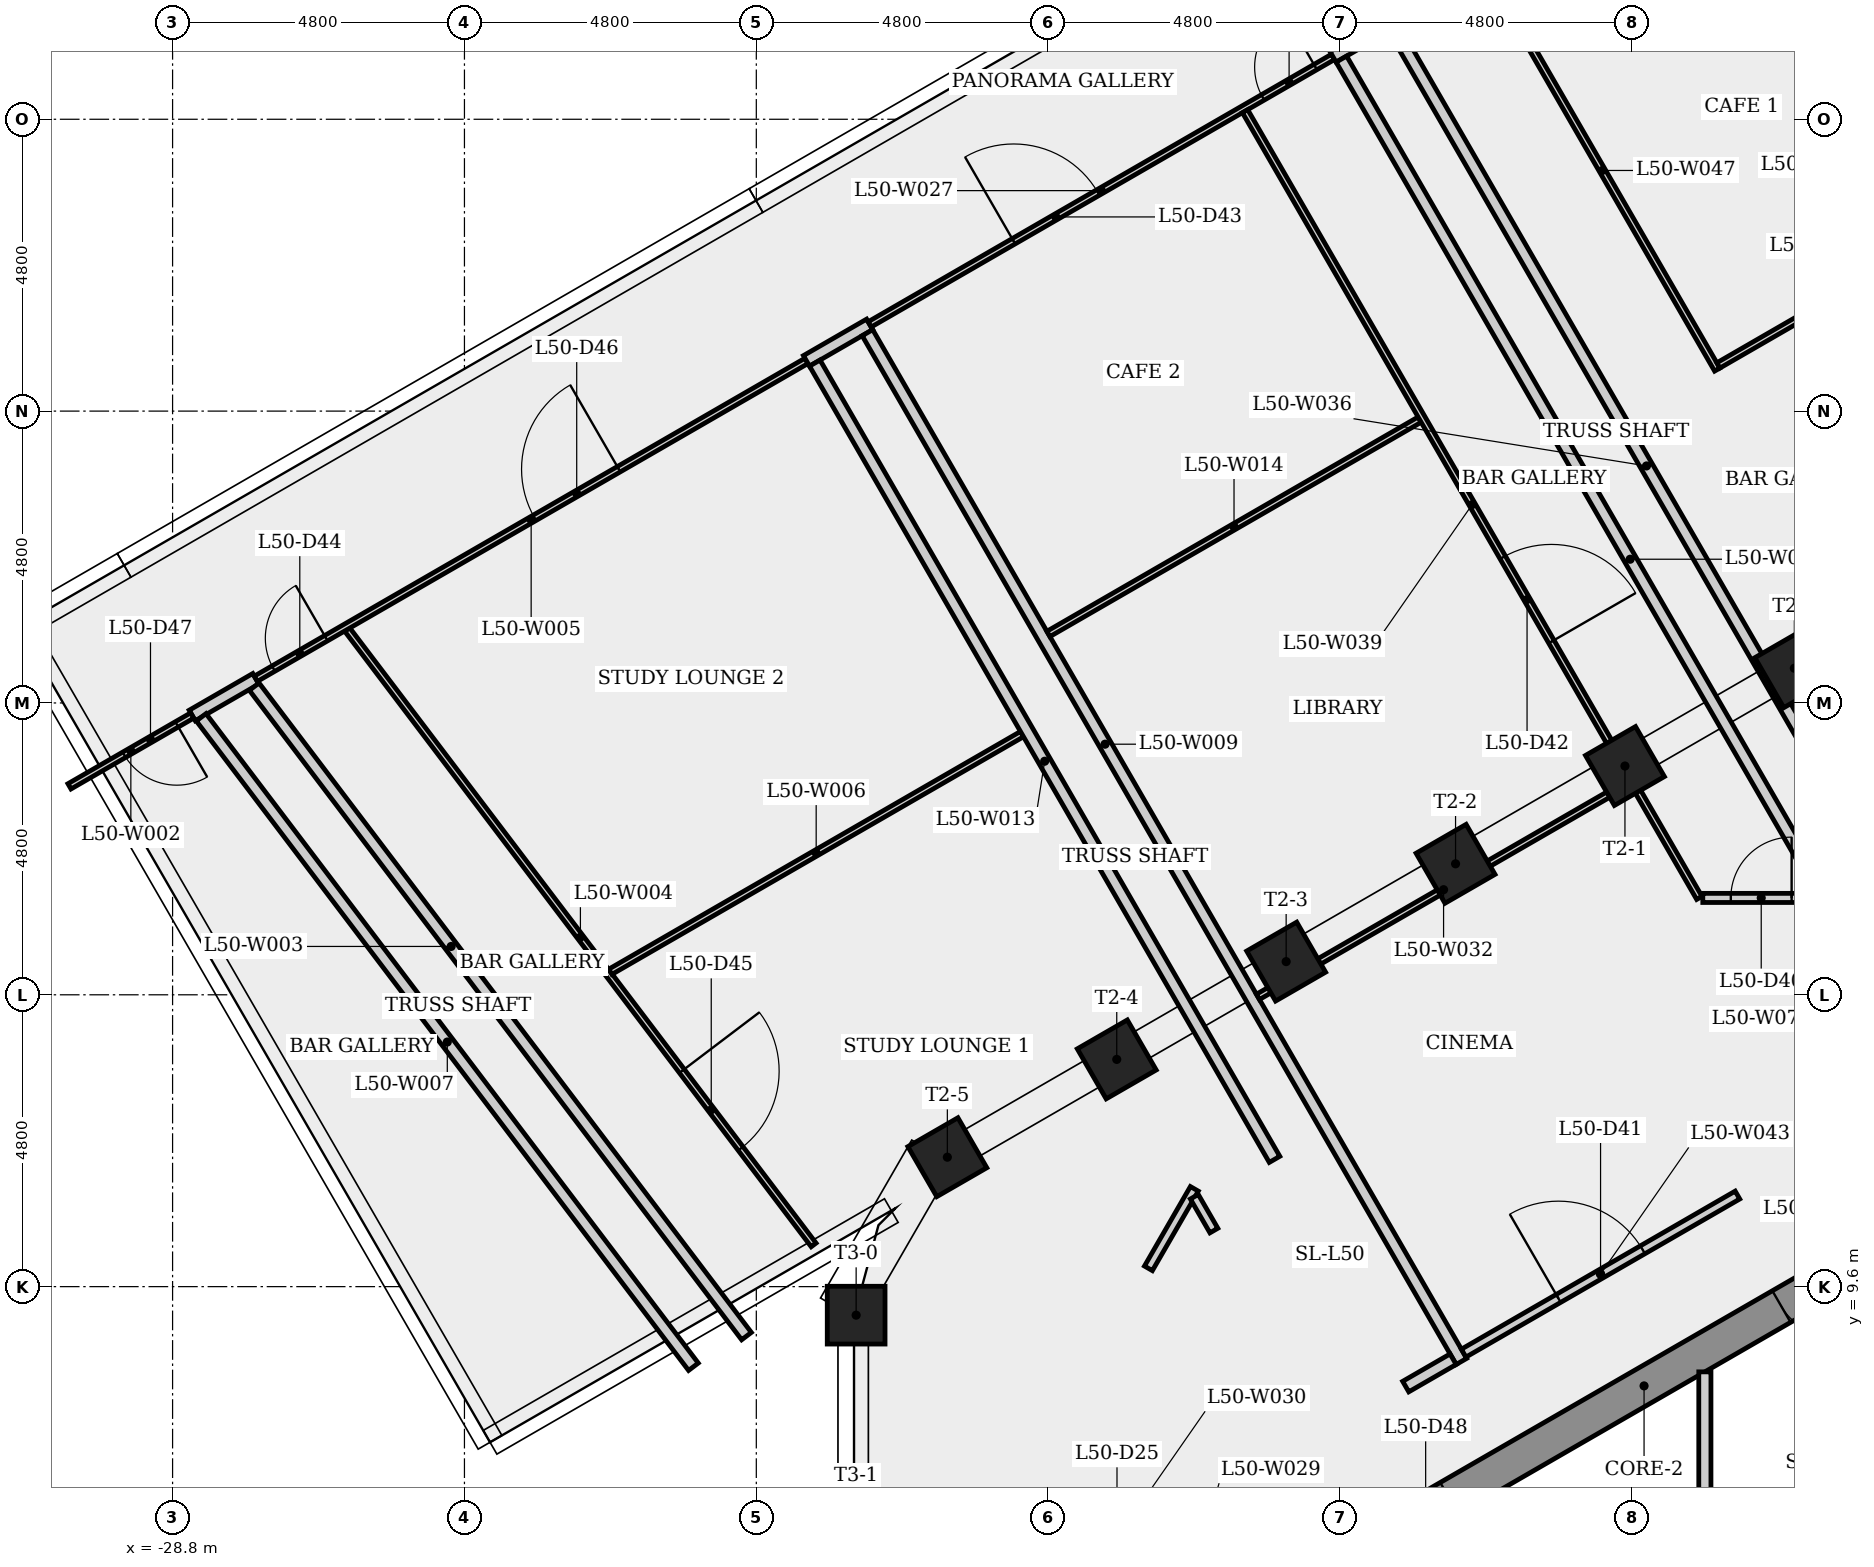
"""IFC4 building model, lengths in metres.
Left out: names, types, materials, properties, quantities, classifications, styles, units other than length and angle.
Written with IfcOpenShell. Run it as: python <this file> out.ifc"""

import sys

from ifc_helpers import new_model, si_unit, direction, frame, frame_2d, origin, origin_2d, place, context, subcontext, project, spatial, rectangle, extrude, element, fill, save


model = new_model("IFC4")
c1 = context("Model", 3, precision=1e-05, world=origin(), true_north=direction((0.0, 1.0)))
c2 = subcontext(c1, "Body", "Model", "MODEL_VIEW")
j1 = project(units=[si_unit("LENGTHUNIT", "METRE"), si_unit("PLANEANGLEUNIT", "RADIAN")], contexts=[c1])
p1 = place(None, origin())
s1 = spatial("IfcSite", under=j1, at=p1, CompositionType="ELEMENT")
p2 = place(p1, origin())
s2 = spatial("IfcBuilding", under=s1, at=p2, CompositionType="ELEMENT")
p3 = place(p2, frame((0.0, 0.0, 186.7)))
s3 = spatial("IfcBuildingStorey", under=s2, at=p3, CompositionType="ELEMENT", Elevation=186.7)
p4 = place(p3, frame((0.15, 10.71, 0.0), z_axis=(0.0, 0.0, 1.0), x_axis=(-0.866023993627, -0.500002442456, 0.0)))
e1 = element("IfcWall", 1, at=p4, inside=s3, PredefinedType="SHEAR", context=c2, shape_type="SweptSolid", body=[
    extrude(rectangle(XDim=10.97, YDim=0.6, at=frame_2d((5.485, 0.0))), origin(), (0.0, 0.0, 1.0), 4.0),
])
p5 = place(p4, frame((9.182, 0.0, 0.0)))
e2 = element("IfcOpeningElement", 2, at=p5, cuts=e1, PredefinedType="OPENING", context=c2, shape_type="SweptSolid", body=[
    extrude(rectangle(XDim=0.9, YDim=2.1, at=frame_2d((0.45, 1.05))), frame((0.0, 0.31, 0.0), z_axis=(0.0, -1.0, 0.0), x_axis=(1.0, 0.0, 0.0)), (0.0, 0.0, 1.0), 0.62),
])
p6 = place(p4, frame((1.975, 0.0, 0.0)))
e3 = element("IfcOpeningElement", 3, at=p6, cuts=e1, PredefinedType="OPENING", context=c2, shape_type="SweptSolid", body=[
    extrude(rectangle(XDim=0.9, YDim=2.1, at=frame_2d((0.45, 1.05))), frame((0.0, 0.31, 0.0), z_axis=(0.0, -1.0, 0.0), x_axis=(1.0, 0.0, 0.0)), (0.0, 0.0, 1.0), 0.62),
])
for number, where, z_axis, x_axis in (
    (4, (-2.128, 19.771, 0.0), (0.0, 0.0, 1.0), (-0.5, 0.866, 0.0)),
    (5, (-4.914, 18.163, 0.0), (0.0, 0.0, 1.0), (-0.5, 0.866, 0.0)),
    (6, (-7.7, 16.554, 0.0), (0.0, 0.0, 1.0), (-0.5, 0.866, 0.0)),
    (7, (-10.486, 14.946, 0.0), (0.0, 0.0, 1.0), (-0.5, 0.866, 0.0)),
    (8, (-13.272, 13.337, 0.0), (0.0, 0.0, 1.0), (-0.5, 0.866, 0.0)),
    (9, (-16.058, 11.729, 0.0), (0.0, 0.0, 1.0), (-0.5, 0.866, 0.0)),
    (10, (-17.558, 9.131, 0.0), (0.0, 0.0, 1.0), (-1.0, 0.0, 0.0)),
):
    element("IfcColumn", number, at=place(p3, frame(where, z_axis=z_axis, x_axis=x_axis)), inside=s3, PredefinedType="COLUMN", context=c2, shape_type="SweptSolid", body=[
        extrude(rectangle(XDim=0.95, YDim=0.95, at=origin_2d()), origin(), (0.0, 0.0, 1.0), 4.0),
    ])
p7 = place(p3, frame((-28.477, 18.994, 0.0), z_axis=(0.0, 0.0, 1.0), x_axis=(0.866108180176, 0.499856599668, 0.0)))
e11 = element("IfcWall", 11, at=p7, inside=s3, PredefinedType="PLUMBINGWALL", context=c2, shape_type="SweptSolid", body=[
    extrude(rectangle(XDim=1.208, YDim=0.2, at=frame_2d((0.604, 0.0))), origin(), (0.0, 0.0, 1.0), 3.6),
])
p8 = place(p3, frame((-28.477, 18.994, 0.0), z_axis=(0.0, 0.0, 1.0), x_axis=(-0.86603036398, -0.499991408591, 0.0)))
e12 = element("IfcWall", 12, at=p8, inside=s3, PredefinedType="PARTITIONING", context=c2, shape_type="SweptSolid", body=[
    extrude(rectangle(XDim=2.331, YDim=0.1, at=frame_2d((1.166, 0.0))), origin(), (0.0, 0.0, 1.0), 3.6),
])
p9 = place(p8, frame((0.292, 0.0, 0.0)))
e13 = element("IfcOpeningElement", 13, at=p9, cuts=e12, PredefinedType="OPENING", context=c2, shape_type="SweptSolid", body=[
    extrude(rectangle(XDim=1.0, YDim=2.1, at=frame_2d((0.5, 1.05))), frame((0.0, 0.06, 0.0), z_axis=(0.0, -1.0, 0.0), x_axis=(1.0, 0.0, 0.0)), (0.0, 0.0, 1.0), 0.12),
])
p10 = place(p3, frame((-27.457, 19.468, 0.0), z_axis=(0.0, 0.0, 1.0), x_axis=(0.60402881465, -0.796962477832, 0.0)))
e14 = element("IfcWall", 14, at=p10, inside=s3, PredefinedType="PLUMBINGWALL", context=c2, shape_type="SweptSolid", body=[
    extrude(rectangle(XDim=13.403, YDim=0.2, at=frame_2d((6.702, 0.0))), origin(), (0.0, 0.0, 1.0), 3.6),
])
p11 = place(p3, frame((-25.929, 20.408, 0.0), z_axis=(0.0, 0.0, 1.0), x_axis=(0.604027547498, -0.796963438223, 0.0)))
e15 = element("IfcWall", 15, at=p11, inside=s3, PredefinedType="PARTITIONING", context=c2, shape_type="SweptSolid", body=[
    extrude(rectangle(XDim=12.701, YDim=0.1, at=frame_2d((6.35, 0.0))), origin(), (0.0, 0.0, 1.0), 3.6),
])
p12 = place(p11, frame((9.113, 0.0, 0.0)))
e16 = element("IfcOpeningElement", 16, at=p12, cuts=e15, PredefinedType="OPENING", context=c2, shape_type="SweptSolid", body=[
    extrude(rectangle(XDim=1.6, YDim=2.1, at=frame_2d((0.8, 1.05))), frame((0.0, 0.06, 0.0), z_axis=(0.0, -1.0, 0.0), x_axis=(1.0, 0.0, 0.0)), (0.0, 0.0, 1.0), 0.12),
])
p13 = place(p3, frame((-27.431, 19.598, 0.0), z_axis=(0.0, 0.0, 1.0), x_axis=(0.866023465201, 0.500003357709, 0.0)))
e17 = element("IfcWall", 17, at=p13, inside=s3, PredefinedType="PARTITIONING", context=c2, shape_type="SweptSolid", body=[
    extrude(rectangle(XDim=10.458, YDim=0.1, at=frame_2d((5.229, 0.0))), origin(), (0.0, 0.0, 1.0), 3.6),
])
p14 = place(p13, frame((0.335, 0.0, 0.0)))
e18 = element("IfcOpeningElement", 18, at=p14, cuts=e17, PredefinedType="OPENING", context=c2, shape_type="SweptSolid", body=[
    extrude(rectangle(XDim=1.0, YDim=2.1, at=frame_2d((0.5, 1.05))), frame((0.0, 0.06, 0.0), z_axis=(0.0, -1.0, 0.0), x_axis=(1.0, 0.0, 0.0)), (0.0, 0.0, 1.0), 0.12),
])
p15 = place(p13, frame((5.294, 0.0, 0.0)))
e19 = element("IfcOpeningElement", 19, at=p15, cuts=e17, PredefinedType="OPENING", context=c2, shape_type="SweptSolid", body=[
    extrude(rectangle(XDim=1.6, YDim=2.1, at=frame_2d((0.8, 1.05))), frame((0.0, 0.06, 0.0), z_axis=(0.0, -1.0, 0.0), x_axis=(1.0, 0.0, 0.0)), (0.0, 0.0, 1.0), 0.12),
])
p16 = place(p3, frame((-21.6, 14.779, 0.0), z_axis=(0.0, 0.0, 1.0), x_axis=(0.866022269728, 0.500005428306, 0.0)))
e20 = element("IfcWall", 20, at=p16, inside=s3, PredefinedType="PARTITIONING", context=c2, shape_type="SweptSolid", body=[
    extrude(rectangle(XDim=7.817, YDim=0.1, at=frame_2d((3.908, 0.0))), origin(), (0.0, 0.0, 1.0), 3.6),
])
p17 = place(p3, frame((-20.234, 8.282, 0.0), z_axis=(0.0, 0.0, 1.0), x_axis=(-0.60402881465, 0.796962477832, 0.0)))
e21 = element("IfcWall", 21, at=p17, inside=s3, PredefinedType="PLUMBINGWALL", context=c2, shape_type="SweptSolid", body=[
    extrude(rectangle(XDim=13.403, YDim=0.2, at=frame_2d((6.702, 0.0))), origin(), (0.0, 0.0, 1.0), 3.6),
])
p18 = place(p3, frame((-18.375, 24.826, 0.0), z_axis=(0.0, 0.0, 1.0), x_axis=(0.866094119867, 0.499880961361, 0.0)))
e22 = element("IfcWall", 22, at=p18, inside=s3, PredefinedType="PLUMBINGWALL", context=c2, shape_type="SweptSolid", body=[
    extrude(rectangle(XDim=1.2, YDim=0.2, at=frame_2d((0.6, 0.0))), origin(), (0.0, 0.0, 1.0), 3.6),
])
p19 = place(p3, frame((-17.372, 25.29, 0.0), z_axis=(0.0, 0.0, 1.0), x_axis=(0.5000029704, -0.866023688816, 0.0)))
e23 = element("IfcWall", 23, at=p19, inside=s3, PredefinedType="PLUMBINGWALL", context=c2, shape_type="SweptSolid", body=[
    extrude(rectangle(XDim=19.538, YDim=0.2, at=frame_2d((9.769, 0.0))), origin(), (0.0, 0.0, 1.0), 3.6),
])
p20 = place(p3, frame((-18.238, 24.79, 0.0), z_axis=(0.0, 0.0, 1.0), x_axis=(0.500002415695, -0.866024009078, 0.0)))
e24 = element("IfcWall", 24, at=p20, inside=s3, PredefinedType="PLUMBINGWALL", context=c2, shape_type="SweptSolid", body=[
    extrude(rectangle(XDim=15.123, YDim=0.2, at=frame_2d((7.561, 0.0))), origin(), (0.0, 0.0, 1.0), 3.6),
])
p21 = place(p3, frame((-14.396, 20.335, 0.0), z_axis=(0.0, 0.0, 1.0), x_axis=(0.866031034943, 0.499990246421, 0.0)))
e25 = element("IfcWall", 25, at=p21, inside=s3, PredefinedType="PARTITIONING", context=c2, shape_type="SweptSolid", body=[
    extrude(rectangle(XDim=7.05, YDim=0.1, at=frame_2d((3.525, 0.0))), origin(), (0.0, 0.0, 1.0), 3.6),
])
p22 = place(p3, frame((-12.751, 9.901, 0.0), z_axis=(0.0, 0.0, 1.0), x_axis=(0.500016320516, 0.866015980925, 0.0)))
e26 = element("IfcWall", 26, at=p22, inside=s3, PredefinedType="PARTITIONING", context=c2, shape_type="SweptSolid", body=[
    extrude(rectangle(XDim=1.51, YDim=0.15, at=frame_2d((0.755, 0.0))), origin(), (0.0, 0.0, 1.0), 3.6),
])
p23 = place(p3, frame((-11.996, 11.079, 0.0), z_axis=(0.0, 0.0, 1.0), x_axis=(0.50006233641, -0.86598941085, 0.0)))
e27 = element("IfcWall", 27, at=p23, inside=s3, PredefinedType="PARTITIONING", context=c2, shape_type="SweptSolid", body=[
    extrude(rectangle(XDim=0.643, YDim=0.15, at=frame_2d((0.321, 0.0))), origin(), (0.0, 0.0, 1.0), 3.6),
])
p24 = place(p3, frame((-17.336, 25.426, 0.0), z_axis=(0.0, 0.0, 1.0), x_axis=(0.866020190133, 0.500009030201, 0.0)))
e28 = element("IfcWall", 28, at=p24, inside=s3, PredefinedType="PARTITIONING", context=c2, shape_type="SweptSolid", body=[
    extrude(rectangle(XDim=8.8, YDim=0.1, at=frame_2d((4.4, 0.0))), origin(), (0.0, 0.0, 1.0), 3.6),
])
p25 = place(p24, frame((7.465, 0.0, 0.0)))
e29 = element("IfcOpeningElement", 29, at=p25, cuts=e28, PredefinedType="OPENING", context=c2, shape_type="SweptSolid", body=[
    extrude(rectangle(XDim=1.0, YDim=2.1, at=frame_2d((0.5, 1.05))), frame((0.0, 0.06, 0.0), z_axis=(0.0, -1.0, 0.0), x_axis=(1.0, 0.0, 0.0)), (0.0, 0.0, 1.0), 0.12),
])
p26 = place(p24, frame((2.735, 0.0, 0.0)))
e30 = element("IfcOpeningElement", 30, at=p26, cuts=e28, PredefinedType="OPENING", context=c2, shape_type="SweptSolid", body=[
    extrude(rectangle(XDim=1.6, YDim=2.1, at=frame_2d((0.8, 1.05))), frame((0.0, 0.06, 0.0), z_axis=(0.0, -1.0, 0.0), x_axis=(1.0, 0.0, 0.0)), (0.0, 0.0, 1.0), 0.12),
])
p27 = place(p3, frame((-10.95, 14.366, 0.0), z_axis=(0.0, 0.0, 1.0), x_axis=(0.866016039709, 0.500016218704, 0.0)))
e31 = element("IfcWall", 31, at=p27, inside=s3, PredefinedType="PARTITIONING", context=c2, shape_type="SweptSolid", body=[
    extrude(rectangle(XDim=7.05, YDim=0.1, at=frame_2d((3.525, 0.0))), origin(), (0.0, 0.0, 1.0), 3.6),
])
p28 = place(p3, frame((-9.715, 29.826, 0.0), z_axis=(0.0, 0.0, 1.0), x_axis=(0.866094119867, 0.499880961361, 0.0)))
e32 = element("IfcWall", 32, at=p28, inside=s3, PredefinedType="PLUMBINGWALL", context=c2, shape_type="SweptSolid", body=[
    extrude(rectangle(XDim=1.2, YDim=0.2, at=frame_2d((0.6, 0.0))), origin(), (0.0, 0.0, 1.0), 3.6),
])
p29 = place(p3, frame((-8.712, 30.29, 0.0), z_axis=(0.0, 0.0, 1.0), x_axis=(0.500001553912, -0.866024506631, 0.0)))
e33 = element("IfcWall", 33, at=p29, inside=s3, PredefinedType="PLUMBINGWALL", context=c2, shape_type="SweptSolid", body=[
    extrude(rectangle(XDim=16.608, YDim=0.2, at=frame_2d((8.304, 0.0))), origin(), (0.0, 0.0, 1.0), 3.6),
])
p30 = place(p3, frame((-8.52, 7.956, 0.0), z_axis=(0.0, 0.0, 1.0), x_axis=(0.865964261186, 0.500105887137, 0.0)))
e34 = element("IfcWall", 34, at=p30, inside=s3, PredefinedType="PLUMBINGWALL", context=c2, shape_type="SweptSolid", body=[
    extrude(rectangle(XDim=0.9, YDim=0.2, at=frame_2d((0.45, 0.0))), origin(), (0.0, 0.0, 1.0), 3.6),
])
p31 = place(p3, frame((-11.162, 28.933, 0.0), z_axis=(0.0, 0.0, 1.0), x_axis=(0.500005339912, -0.866022320763, 0.0)))
e35 = element("IfcWall", 35, at=p31, inside=s3, PredefinedType="PARTITIONING", context=c2, shape_type="SweptSolid", body=[
    extrude(rectangle(XDim=14.941, YDim=0.1, at=frame_2d((7.471, 0.0))), origin(), (0.0, 0.0, 1.0), 3.6),
])
p32 = place(p31, frame((8.475, 0.0, 0.0)))
e36 = element("IfcOpeningElement", 36, at=p32, cuts=e35, PredefinedType="OPENING", context=c2, shape_type="SweptSolid", body=[
    extrude(rectangle(XDim=1.6, YDim=2.1, at=frame_2d((0.8, 1.05))), frame((0.0, 0.06, 0.0), z_axis=(0.0, -1.0, 0.0), x_axis=(1.0, 0.0, 0.0)), (0.0, 0.0, 1.0), 0.12),
])
p33 = place(p3, frame((-7.567, 8.506, 0.0), z_axis=(0.0, 0.0, 1.0), x_axis=(0.866029992723, 0.499992051641, 0.0)))
e37 = element("IfcWall", 37, at=p33, inside=s3, PredefinedType="PARTITIONING", context=c2, shape_type="SweptSolid", body=[
    extrude(rectangle(XDim=5.2, YDim=0.15, at=frame_2d((2.6, 0.0))), origin(), (0.0, 0.0, 1.0), 3.6),
])
p34 = place(p33, frame((1.8, 0.0, 0.0)))
e38 = element("IfcOpeningElement", 38, at=p34, cuts=e37, PredefinedType="OPENING", context=c2, shape_type="SweptSolid", body=[
    extrude(rectangle(XDim=1.6, YDim=2.1, at=frame_2d((0.8, 1.05))), frame((0.0, 0.085, 0.0), z_axis=(0.0, -1.0, 0.0), x_axis=(1.0, 0.0, 0.0)), (0.0, 0.0, 1.0), 0.17),
])
p35 = place(p3, frame((-7.178, 31.233, 0.0), z_axis=(0.0, 0.0, 1.0), x_axis=(0.500006527538, -0.866021635076, 0.0)))
e39 = element("IfcWall", 39, at=p35, inside=s3, PredefinedType="PARTITIONING", context=c2, shape_type="SweptSolid", body=[
    extrude(rectangle(XDim=7.563, YDim=0.1, at=frame_2d((3.782, 0.0))), origin(), (0.0, 0.0, 1.0), 3.6),
])
p36 = place(p3, frame((-3.634, 15.993, 0.0), z_axis=(0.0, 0.0, 1.0), x_axis=(1.0, 0.0, 0.0)))
e40 = element("IfcWall", 40, at=p36, inside=s3, PredefinedType="PARTITIONING", context=c2, shape_type="SweptSolid", body=[
    extrude(rectangle(XDim=1.921, YDim=0.15, at=frame_2d((0.96, 0.0))), origin(), (0.0, 0.0, 1.0), 3.6),
])
p37 = place(p36, frame((0.461, 0.0, 0.0)))
e41 = element("IfcOpeningElement", 41, at=p37, cuts=e40, PredefinedType="OPENING", context=c2, shape_type="SweptSolid", body=[
    extrude(rectangle(XDim=1.0, YDim=2.1, at=frame_2d((0.5, 1.05))), frame((0.0, 0.085, 0.0), z_axis=(0.0, -1.0, 0.0), x_axis=(1.0, 0.0, 0.0)), (0.0, 0.0, 1.0), 0.17),
])
p38 = place(p3, frame((-3.6, 8.198, 0.0), z_axis=(0.0, 0.0, 1.0), x_axis=(0.0, -1.0, 0.0)))
e42 = element("IfcWall", 42, at=p38, inside=s3, PredefinedType="PARTITIONING", context=c2, shape_type="SweptSolid", body=[
    extrude(rectangle(XDim=2.924, YDim=0.2, at=frame_2d((1.462, 0.0))), origin(), (0.0, 0.0, 1.0), 3.6),
])
p39 = place(p3, frame((-3.378, 24.751, 0.0), z_axis=(0.0, 0.0, 1.0), x_axis=(0.866060495566, 0.499939214325, 0.0)))
e43 = element("IfcWall", 43, at=p39, inside=s3, PredefinedType="PARTITIONING", context=c2, shape_type="SweptSolid", body=[
    extrude(rectangle(XDim=3.835, YDim=0.1, at=frame_2d((1.917, 0.0))), origin(), (0.0, 0.0, 1.0), 3.6),
])
p40 = place(p3, frame((-1.663, 16.08, 0.0), z_axis=(0.0, 0.0, 1.0), x_axis=(-0.499998792841, 0.866026100737, 0.0)))
e44 = element("IfcWall", 44, at=p40, inside=s3, PredefinedType="PLUMBINGWALL", context=c2, shape_type="SweptSolid", body=[
    extrude(rectangle(XDim=15.831, YDim=0.2, at=frame_2d((7.915, 0.0))), origin(), (0.0, 0.0, 1.0), 3.6),
])
p41 = place(p25, origin())
e45 = element("IfcDoor", 45, at=p41, inside=s3, OperationType="SINGLE_SWING_RIGHT", PredefinedType="DOOR", context=c2, shape_type="SweptSolid", body=[
    extrude(rectangle(XDim=1.0, YDim=2.1, at=frame_2d((0.5, 1.05))), frame((0.0, 0.025, 0.0), z_axis=(0.0, -1.0, 0.0), x_axis=(1.0, 0.0, 0.0)), (0.0, 0.0, 1.0), 0.05),
])
fill(e29, e45)
p42 = place(p37, origin())
e46 = element("IfcDoor", 46, at=p42, inside=s3, OperationType="SINGLE_SWING_RIGHT", PredefinedType="DOOR", context=c2, shape_type="SweptSolid", body=[
    extrude(rectangle(XDim=1.0, YDim=2.1, at=frame_2d((0.5, 1.05))), frame((0.0, 0.025, 0.0), z_axis=(0.0, -1.0, 0.0), x_axis=(1.0, 0.0, 0.0)), (0.0, 0.0, 1.0), 0.05),
])
fill(e41, e46)
p43 = place(p34, origin())
e47 = element("IfcDoor", 47, at=p43, inside=s3, OperationType="SINGLE_SWING_LEFT", PredefinedType="DOOR", context=c2, shape_type="SweptSolid", body=[
    extrude(rectangle(XDim=1.6, YDim=2.1, at=frame_2d((0.8, 1.05))), frame((0.0, 0.025, 0.0), z_axis=(0.0, -1.0, 0.0), x_axis=(1.0, 0.0, 0.0)), (0.0, 0.0, 1.0), 0.05),
])
fill(e38, e47)
p44 = place(p32, origin())
e48 = element("IfcDoor", 48, at=p44, inside=s3, OperationType="SINGLE_SWING_RIGHT", PredefinedType="DOOR", context=c2, shape_type="SweptSolid", body=[
    extrude(rectangle(XDim=1.6, YDim=2.1, at=frame_2d((0.8, 1.05))), frame((0.0, 0.025, 0.0), z_axis=(0.0, -1.0, 0.0), x_axis=(1.0, 0.0, 0.0)), (0.0, 0.0, 1.0), 0.05),
])
fill(e36, e48)
p45 = place(p26, origin())
e49 = element("IfcDoor", 49, at=p45, inside=s3, OperationType="SINGLE_SWING_LEFT", PredefinedType="DOOR", context=c2, shape_type="SweptSolid", body=[
    extrude(rectangle(XDim=1.6, YDim=2.1, at=frame_2d((0.8, 1.05))), frame((0.0, 0.025, 0.0), z_axis=(0.0, -1.0, 0.0), x_axis=(1.0, 0.0, 0.0)), (0.0, 0.0, 1.0), 0.05),
])
fill(e30, e49)
p46 = place(p14, origin())
e50 = element("IfcDoor", 50, at=p46, inside=s3, OperationType="SINGLE_SWING_RIGHT", PredefinedType="DOOR", context=c2, shape_type="SweptSolid", body=[
    extrude(rectangle(XDim=1.0, YDim=2.1, at=frame_2d((0.5, 1.05))), frame((0.0, 0.025, 0.0), z_axis=(0.0, -1.0, 0.0), x_axis=(1.0, 0.0, 0.0)), (0.0, 0.0, 1.0), 0.05),
])
fill(e18, e50)
p47 = place(p12, origin())
e51 = element("IfcDoor", 51, at=p47, inside=s3, OperationType="SINGLE_SWING_LEFT", PredefinedType="DOOR", context=c2, shape_type="SweptSolid", body=[
    extrude(rectangle(XDim=1.6, YDim=2.1, at=frame_2d((0.8, 1.05))), frame((0.0, 0.025, 0.0), z_axis=(0.0, -1.0, 0.0), x_axis=(1.0, 0.0, 0.0)), (0.0, 0.0, 1.0), 0.05),
])
fill(e16, e51)
p48 = place(p15, origin())
e52 = element("IfcDoor", 52, at=p48, inside=s3, OperationType="SINGLE_SWING_RIGHT", PredefinedType="DOOR", context=c2, shape_type="SweptSolid", body=[
    extrude(rectangle(XDim=1.6, YDim=2.1, at=frame_2d((0.8, 1.05))), frame((0.0, 0.025, 0.0), z_axis=(0.0, -1.0, 0.0), x_axis=(1.0, 0.0, 0.0)), (0.0, 0.0, 1.0), 0.05),
])
fill(e19, e52)
p49 = place(p9, origin())
e53 = element("IfcDoor", 53, at=p49, inside=s3, OperationType="SINGLE_SWING_LEFT", PredefinedType="DOOR", context=c2, shape_type="SweptSolid", body=[
    extrude(rectangle(XDim=1.0, YDim=2.1, at=frame_2d((0.5, 1.05))), frame((0.0, 0.025, 0.0), z_axis=(0.0, -1.0, 0.0), x_axis=(1.0, 0.0, 0.0)), (0.0, 0.0, 1.0), 0.05),
])
fill(e13, e53)
p50 = place(p6, origin())
e54 = element("IfcDoor", 54, at=p50, inside=s3, OperationType="SINGLE_SWING_LEFT", PredefinedType="DOOR", context=c2, shape_type="SweptSolid", body=[
    extrude(rectangle(XDim=0.9, YDim=2.1, at=frame_2d((0.45, 1.05))), frame((0.0, 0.025, 0.0), z_axis=(0.0, -1.0, 0.0), x_axis=(1.0, 0.0, 0.0)), (0.0, 0.0, 1.0), 0.05),
])
fill(e3, e54)
save(model, sys.argv[1])
